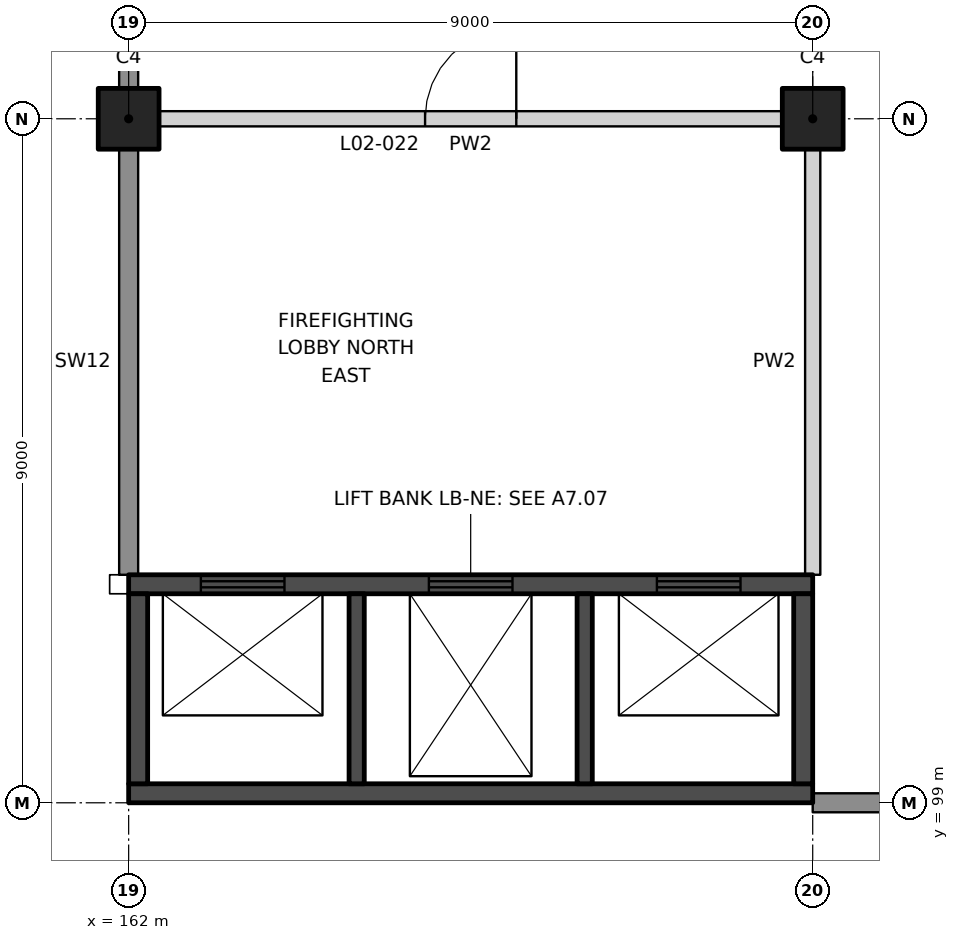
"""IFC4 building model, lengths in metres.
Left out: names, types, materials, properties, quantities, classifications, styles, units other than length and angle.
Written with IfcOpenShell. Run it as: python <this file> out.ifc"""

import sys

from ifc_helpers import new_model, si_unit, direction, frame, frame_2d, origin, origin_2d, place, context, subcontext, project, spatial, rectangle, extrude, element, fill, save


model = new_model("IFC4")
c1 = context("Model", 3, precision=1e-05, world=origin(), true_north=direction((0.0, 1.0)))
c2 = subcontext(c1, "Body", "Model", "MODEL_VIEW")
j1 = project(units=[si_unit("LENGTHUNIT", "METRE"), si_unit("PLANEANGLEUNIT", "RADIAN")], contexts=[c1])
p1 = place(None, origin())
s1 = spatial("IfcSite", under=j1, at=p1, CompositionType="ELEMENT")
p2 = place(p1, origin())
s2 = spatial("IfcBuilding", under=s1, at=p2, CompositionType="ELEMENT")
p3 = place(p2, frame((0.0, 0.0, 11.5)))
s3 = spatial("IfcBuildingStorey", under=s2, at=p3, CompositionType="ELEMENT", Elevation=11.5)
for number, where, z_axis, x_axis in (
    (1, (162.0, 108.0, 0.0), (0.0, 0.0, 1.0), (1.0, 0.0, 0.0)),
    (2, (171.0, 108.0, 0.0), (0.0, 0.0, 1.0), (1.0, 0.0, 0.0)),
):
    element("IfcColumn", number, at=place(p3, frame(where, z_axis=z_axis, x_axis=x_axis)), inside=s3, PredefinedType="COLUMN", context=c2, shape_type="SweptSolid", body=[
        extrude(rectangle(XDim=0.8, YDim=0.8, at=origin_2d()), origin(), (0.0, 0.0, 1.0), 10.5),
    ])
p4 = place(p3, frame((162.4, 108.0, 0.0), z_axis=(0.0, 0.0, 1.0), x_axis=(1.0, 0.0, 0.0)))
e3 = element("IfcWall", 3, at=p4, inside=s3, PredefinedType="PARTITIONING", context=c2, shape_type="SweptSolid", body=[
    extrude(rectangle(XDim=8.2, YDim=0.2, at=frame_2d((4.1, 0.0))), origin(), (0.0, 0.0, 1.0), 9.25),
])
p5 = place(p4, frame((3.5, 0.0, 0.0)))
e4 = element("IfcOpeningElement", 4, at=p5, cuts=e3, PredefinedType="OPENING", context=c2, shape_type="SweptSolid", body=[
    extrude(rectangle(XDim=1.2, YDim=2.1, at=frame_2d((0.6, 1.05))), frame((0.0, 0.11, 0.0), z_axis=(0.0, -1.0, 0.0), x_axis=(1.0, 0.0, 0.0)), (0.0, 0.0, 1.0), 0.22),
])
p6 = place(p3, frame((171.0, 102.0, 0.0), z_axis=(0.0, 0.0, 1.0), x_axis=(0.0, 1.0, 0.0)))
e5 = element("IfcWall", 5, at=p6, inside=s3, PredefinedType="PARTITIONING", context=c2, shape_type="SweptSolid", body=[
    extrude(rectangle(XDim=5.6, YDim=0.2, at=frame_2d((2.8, 0.0))), origin(), (0.0, 0.0, 1.0), 9.45),
])
p7 = place(p3, frame((162.0, 101.875, 0.0), z_axis=(0.0, 0.0, 1.0), x_axis=(1.0, 0.0, 0.0)))
e6 = element("IfcWall", 6, at=p7, inside=s3, PredefinedType="SHEAR", context=c2, shape_type="SweptSolid", body=[
    extrude(rectangle(XDim=9.0, YDim=0.25, at=frame_2d((4.5, 0.0))), origin(), (0.0, 0.0, 1.0), 10.5),
])
p8 = place(p7, frame((0.95, 0.0, 0.0)))
e7 = element("IfcOpeningElement", 7, at=p8, cuts=e6, PredefinedType="OPENING", context=c2, shape_type="SweptSolid", body=[
    extrude(rectangle(XDim=1.1, YDim=2.1, at=frame_2d((0.55, 1.05))), frame((0.0, 0.135, 0.0), z_axis=(0.0, -1.0, 0.0), x_axis=(1.0, 0.0, 0.0)), (0.0, 0.0, 1.0), 0.27),
])
p9 = place(p7, frame((3.95, 0.0, 0.0)))
e8 = element("IfcOpeningElement", 8, at=p9, cuts=e6, PredefinedType="OPENING", context=c2, shape_type="SweptSolid", body=[
    extrude(rectangle(XDim=1.1, YDim=2.1, at=frame_2d((0.55, 1.05))), frame((0.0, 0.135, 0.0), z_axis=(0.0, -1.0, 0.0), x_axis=(1.0, 0.0, 0.0)), (0.0, 0.0, 1.0), 0.27),
])
p10 = place(p7, frame((6.95, 0.0, 0.0)))
e9 = element("IfcOpeningElement", 9, at=p10, cuts=e6, PredefinedType="OPENING", context=c2, shape_type="SweptSolid", body=[
    extrude(rectangle(XDim=1.1, YDim=2.1, at=frame_2d((0.55, 1.05))), frame((0.0, 0.135, 0.0), z_axis=(0.0, -1.0, 0.0), x_axis=(1.0, 0.0, 0.0)), (0.0, 0.0, 1.0), 0.27),
])
p11 = place(p3, frame((162.0, 99.125, 0.0), z_axis=(0.0, 0.0, 1.0), x_axis=(1.0, 0.0, 0.0)))
e10 = element("IfcWall", 10, at=p11, inside=s3, PredefinedType="SHEAR", context=c2, shape_type="SweptSolid", body=[
    extrude(rectangle(XDim=9.0, YDim=0.25, at=frame_2d((4.5, 0.0))), origin(), (0.0, 0.0, 1.0), 10.5),
])
for number, where, z_axis, x_axis in (
    (11, (162.125, 99.25, 0.0), (0.0, 0.0, 1.0), (0.0, 1.0, 0.0)),
    (12, (170.875, 99.25, 0.0), (0.0, 0.0, 1.0), (0.0, 1.0, 0.0)),
):
    element("IfcWall", number, at=place(p3, frame(where, z_axis=z_axis, x_axis=x_axis)), inside=s3, PredefinedType="SHEAR", context=c2, shape_type="SweptSolid", body=[
        extrude(rectangle(XDim=2.5, YDim=0.25, at=frame_2d((1.25, 0.0))), origin(), (0.0, 0.0, 1.0), 10.5),
    ])
for number, where, z_axis, x_axis in (
    (13, (165.0, 99.25, 0.0), (0.0, 0.0, 1.0), (0.0, 1.0, 0.0)),
    (14, (168.0, 99.25, 0.0), (0.0, 0.0, 1.0), (0.0, 1.0, 0.0)),
):
    element("IfcWall", number, at=place(p3, frame(where, z_axis=z_axis, x_axis=x_axis)), inside=s3, PredefinedType="SHEAR", context=c2, shape_type="SweptSolid", body=[
        extrude(rectangle(XDim=2.5, YDim=0.2, at=frame_2d((1.25, 0.0))), origin(), (0.0, 0.0, 1.0), 10.5),
    ])
p12 = place(p3, frame((162.0, 102.0, 0.0), z_axis=(0.0, 0.0, 1.0), x_axis=(0.0, 1.0, 0.0)))
e15 = element("IfcWall", 15, at=p12, inside=s3, PredefinedType="SOLIDWALL", context=c2, shape_type="SweptSolid", body=[
    extrude(rectangle(XDim=5.6, YDim=0.25, at=frame_2d((2.8, 0.0))), origin(), (0.0, 0.0, 1.0), 9.45),
])
p13 = place(p3, frame((162.0, 108.4, 0.0), z_axis=(0.0, 0.0, 1.0), x_axis=(0.0, 1.0, 0.0)))
e16 = element("IfcWall", 16, at=p13, inside=s3, PredefinedType="SOLIDWALL", context=c2, shape_type="SweptSolid", body=[
    extrude(rectangle(XDim=3.1, YDim=0.25, at=frame_2d((1.55, 0.0))), origin(), (0.0, 0.0, 1.0), 9.25),
])
p14 = place(p3, frame((171.0, 99.0, 0.0), z_axis=(0.0, 0.0, 1.0), x_axis=(1.0, 0.0, 0.0)))
e17 = element("IfcWall", 17, at=p14, inside=s3, PredefinedType="SOLIDWALL", context=c2, shape_type="SweptSolid", body=[
    extrude(rectangle(XDim=3.5, YDim=0.25, at=frame_2d((1.75, 0.0))), origin(), (0.0, 0.0, 1.0), 9.15),
])
p15 = place(p5, origin())
e18 = element("IfcDoor", 18, at=p15, inside=s3, OperationType="SINGLE_SWING_RIGHT", PredefinedType="DOOR", context=c2, shape_type="SweptSolid", body=[
    extrude(rectangle(XDim=1.2, YDim=2.1, at=frame_2d((0.6, 1.05))), frame((0.0, 0.025, 0.0), z_axis=(0.0, -1.0, 0.0), x_axis=(1.0, 0.0, 0.0)), (0.0, 0.0, 1.0), 0.05),
])
fill(e4, e18)
p16 = place(p8, origin())
e19 = element("IfcDoor", 19, at=p16, inside=s3, OperationType="DOUBLE_DOOR_SLIDING", PredefinedType="DOOR", context=c2, shape_type="SweptSolid", body=[
    extrude(rectangle(XDim=1.1, YDim=2.1, at=frame_2d((0.55, 1.05))), frame((0.0, 0.025, 0.0), z_axis=(0.0, -1.0, 0.0), x_axis=(1.0, 0.0, 0.0)), (0.0, 0.0, 1.0), 0.05),
])
fill(e7, e19)
p17 = place(p9, origin())
e20 = element("IfcDoor", 20, at=p17, inside=s3, OperationType="DOUBLE_DOOR_SLIDING", PredefinedType="DOOR", context=c2, shape_type="SweptSolid", body=[
    extrude(rectangle(XDim=1.1, YDim=2.1, at=frame_2d((0.55, 1.05))), frame((0.0, 0.025, 0.0), z_axis=(0.0, -1.0, 0.0), x_axis=(1.0, 0.0, 0.0)), (0.0, 0.0, 1.0), 0.05),
])
fill(e8, e20)
p18 = place(p10, origin())
e21 = element("IfcDoor", 21, at=p18, inside=s3, OperationType="DOUBLE_DOOR_SLIDING", PredefinedType="DOOR", context=c2, shape_type="SweptSolid", body=[
    extrude(rectangle(XDim=1.1, YDim=2.1, at=frame_2d((0.55, 1.05))), frame((0.0, 0.025, 0.0), z_axis=(0.0, -1.0, 0.0), x_axis=(1.0, 0.0, 0.0)), (0.0, 0.0, 1.0), 0.05),
])
fill(e9, e21)
save(model, sys.argv[1])
